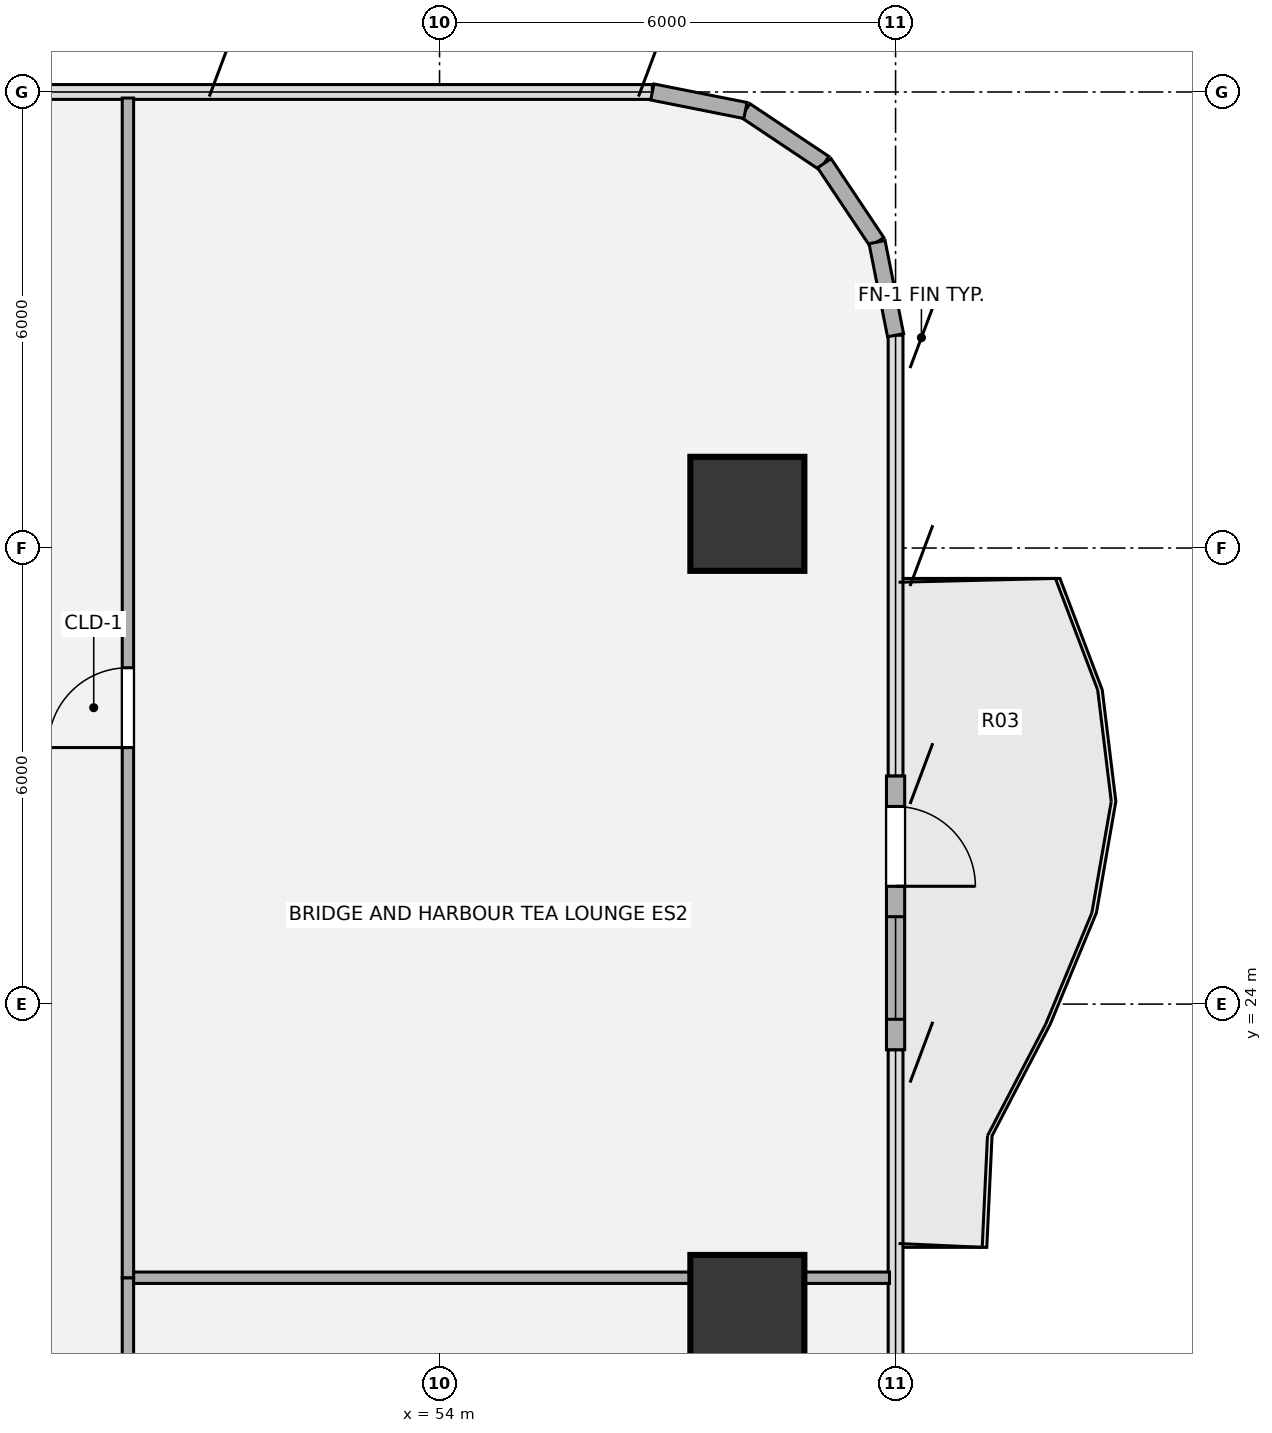
"""IFC4 building model, lengths in metres.
Left out: names, types, materials, properties, quantities, classifications, styles, units other than length and angle.
Written with IfcOpenShell. Run it as: python <this file> out.ifc"""

import sys

from ifc_helpers import new_model, si_unit, direction, frame, frame_2d, origin, origin_2d, place, context, subcontext, project, spatial, rectangle, hollow_circle, extrude, source, transform, mapped, element, fill, save


model = new_model("IFC4")
c1 = context("Model", 3, precision=1e-05, world=origin(), true_north=direction((0.0, 1.0)))
c2 = subcontext(c1, "Body", "Model", "MODEL_VIEW")
j1 = project(units=[si_unit("LENGTHUNIT", "METRE"), si_unit("PLANEANGLEUNIT", "RADIAN")], contexts=[c1])
p1 = place(None, origin())
s1 = spatial("IfcSite", under=j1, at=p1, CompositionType="ELEMENT")
p2 = place(p1, origin())
s2 = spatial("IfcBuilding", under=s1, at=p2, CompositionType="ELEMENT")
p3 = place(p2, frame((0.0, 0.0, 61.02)))
s3 = spatial("IfcBuildingStorey", under=s2, at=p3, CompositionType="ELEMENT", Elevation=61.02)
m1 = source(origin(), c2, "Body", "SweptSolid", [
    extrude(hollow_circle(Radius=0.75, WallThickness=0.05, at=origin_2d()), origin(), (0.0, 0.0, 1.0), 3.78),
])
for number, where, z_axis, x_axis in (
    (1, (58.05, 19.95, 0.0), (0.0, 0.0, 1.0), (1.0, 0.0, 0.0)),
    (2, (58.05, 30.45, 0.0), (0.0, 0.0, 1.0), (1.0, 0.0, 0.0)),
):
    element("IfcColumn", number, at=place(p3, frame(where, z_axis=z_axis, x_axis=x_axis)), inside=s3, PredefinedType="COLUMN", context=c2, shape_type="MappedRepresentation", body=[
        mapped(m1, transform((0.0, 0.0, 0.0), x_axis=(1.0, 0.0, 0.0), y_axis=(0.0, 1.0, 0.0), z_axis=(0.0, 0.0, 1.0), scale=1.0)),
    ])
for number, where, z_axis, x_axis in (
    (3, (58.025, 35.756, 0.0), (0.0, 0.0, 1.0), (0.831, -0.556, 0.0)),
    (4, (59.063, 35.063, 0.0), (0.0, 0.0, 1.0), (0.556, -0.831, 0.0)),
    (5, (59.756, 34.025, 0.0), (0.0, 0.0, 1.0), (0.195, -0.981, 0.0)),
):
    element("IfcWall", number, at=place(p3, frame(where, z_axis=z_axis, x_axis=x_axis)), inside=s3, PredefinedType="SOLIDWALL", context=c2, shape_type="SweptSolid", body=[
        extrude(rectangle(XDim=1.249, YDim=0.215, at=frame_2d((0.624, 0.0))), origin(), (0.0, 0.0, 1.0), 3.53),
    ])
p4 = place(p3, frame((60.0, 27.0, 0.0), z_axis=(0.0, 0.0, 1.0), x_axis=(0.0, -1.0, 0.0)))
e6 = element("IfcWall", 6, at=p4, inside=s3, PredefinedType="SOLIDWALL", context=c2, shape_type="SweptSolid", body=[
    extrude(rectangle(XDim=3.6, YDim=0.24, at=frame_2d((1.8, 0.0))), origin(), (0.0, 0.0, 1.0), 3.53),
])
p5 = place(p4, frame((0.4, 0.0, 0.0)))
e7 = element("IfcOpeningElement", 7, at=p5, cuts=e6, PredefinedType="OPENING", context=c2, shape_type="SweptSolid", body=[
    extrude(rectangle(XDim=1.05, YDim=2.15, at=origin_2d()), frame((0.525, 0.13, 1.075), z_axis=(0.0, -1.0, 0.0), x_axis=(1.0, 0.0, 0.0)), (0.0, 0.0, 1.0), 0.26),
])
p6 = place(p4, frame((1.85, 0.0, 0.85)))
e8 = element("IfcOpeningElement", 8, at=p6, cuts=e6, PredefinedType="OPENING", context=c2, shape_type="SweptSolid", body=[
    extrude(rectangle(XDim=1.35, YDim=1.35, at=origin_2d()), frame((0.675, 0.13, 0.675), z_axis=(0.0, -1.0, 0.0), x_axis=(1.0, 0.0, 0.0)), (0.0, 0.0, 1.0), 0.26),
])
p7 = place(p3, frame((56.8, 36.0, 0.0), z_axis=(0.0, 0.0, 1.0), x_axis=(0.980775717779, -0.195138390419, 0.0)))
e9 = element("IfcWall", 9, at=p7, inside=s3, PredefinedType="SOLIDWALL", context=c2, shape_type="SweptSolid", body=[
    extrude(rectangle(XDim=1.249, YDim=0.215, at=frame_2d((0.624, 0.0))), origin(), (0.0, 0.0, 1.0), 3.53),
])
p8 = place(p3, frame((49.9, 20.4, 0.0), z_axis=(0.0, 0.0, 1.0), x_axis=(1.0, 0.0, 0.0)))
e10 = element("IfcWall", 10, at=p8, inside=s3, PredefinedType="PARTITIONING", context=c2, shape_type="SweptSolid", body=[
    extrude(rectangle(XDim=10.02, YDim=0.15, at=frame_2d((5.01, 0.0))), origin(), (0.0, 0.0, 1.0), 2.982),
])
p9 = place(p3, frame((49.9, 6.08, 0.0), z_axis=(0.0, 0.0, 1.0), x_axis=(0.0, 1.0, 0.0)))
e11 = element("IfcWall", 11, at=p9, inside=s3, PredefinedType="PARTITIONING", context=c2, shape_type="SweptSolid", body=[
    extrude(rectangle(XDim=14.32, YDim=0.15, at=frame_2d((7.16, 0.0))), origin(), (0.0, 0.0, 1.0), 3.5),
])
p10 = place(p9, frame((6.635, 0.0, 0.0)))
e12 = element("IfcOpeningElement", 12, at=p10, cuts=e11, PredefinedType="OPENING", context=c2, shape_type="SweptSolid", body=[
    extrude(rectangle(XDim=1.05, YDim=2.1, at=origin_2d()), frame((0.525, 0.085, 1.05), z_axis=(0.0, -1.0, 0.0), x_axis=(1.0, 0.0, 0.0)), (0.0, 0.0, 1.0), 0.17),
])
p11 = place(p3, frame((49.9, 20.4, 0.0), z_axis=(0.0, 0.0, 1.0), x_axis=(0.0, 1.0, 0.0)))
e13 = element("IfcWall", 13, at=p11, inside=s3, PredefinedType="PARTITIONING", context=c2, shape_type="SweptSolid", body=[
    extrude(rectangle(XDim=15.52, YDim=0.15, at=frame_2d((7.76, 0.0))), origin(), (0.0, 0.0, 1.0), 3.5),
])
p12 = place(p11, frame((6.975, 0.0, 0.0)))
e14 = element("IfcOpeningElement", 14, at=p12, cuts=e13, PredefinedType="OPENING", context=c2, shape_type="SweptSolid", body=[
    extrude(rectangle(XDim=1.05, YDim=2.1, at=origin_2d()), frame((0.525, 0.085, 1.05), z_axis=(0.0, -1.0, 0.0), x_axis=(1.0, 0.0, 0.0)), (0.0, 0.0, 1.0), 0.17),
])
m2 = source(origin(), c2, "Body", "SweptSolid", [
    extrude(rectangle(XDim=1.05, YDim=2.15, at=origin_2d()), frame((0.525, 0.025, 1.075), z_axis=(0.0, -1.0, 0.0), x_axis=(1.0, 0.0, 0.0)), (0.0, 0.0, 1.0), 0.05),
])
p13 = place(p5, origin())
e15 = element("IfcDoor", 15, at=p13, inside=s3, OperationType="SINGLE_SWING_RIGHT", PredefinedType="DOOR", context=c2, shape_type="MappedRepresentation", body=[
    mapped(m2, transform((0.0, 0.0, 0.0), x_axis=(1.0, 0.0, 0.0), y_axis=(0.0, 1.0, 0.0), z_axis=(0.0, 0.0, 1.0), scale=1.0)),
])
fill(e7, e15)
m3 = source(origin(), c2, "Body", "SweptSolid", [
    extrude(rectangle(XDim=1.35, YDim=1.35, at=origin_2d()), frame((0.675, 0.03, 0.675), z_axis=(0.0, -1.0, 0.0), x_axis=(1.0, 0.0, 0.0)), (0.0, 0.0, 1.0), 0.06),
])
p14 = place(p6, origin())
e16 = element("IfcWindow", 16, at=p14, inside=s3, PartitioningType="SINGLE_PANEL", PredefinedType="WINDOW", context=c2, shape_type="MappedRepresentation", body=[
    mapped(m3, transform((0.0, 0.0, 0.0), x_axis=(1.0, 0.0, 0.0), y_axis=(0.0, 1.0, 0.0), z_axis=(0.0, 0.0, 1.0), scale=1.0)),
])
fill(e8, e16)
m4 = source(origin(), c2, "Body", "SweptSolid", [
    extrude(rectangle(XDim=1.05, YDim=2.1, at=origin_2d()), frame((0.525, 0.025, 1.05), z_axis=(0.0, -1.0, 0.0), x_axis=(1.0, 0.0, 0.0)), (0.0, 0.0, 1.0), 0.05),
])
p15 = place(p12, origin())
e17 = element("IfcDoor", 17, at=p15, inside=s3, OperationType="SINGLE_SWING_LEFT", PredefinedType="DOOR", context=c2, shape_type="MappedRepresentation", body=[
    mapped(m4, transform((0.0, 0.0, 0.0), x_axis=(1.0, 0.0, 0.0), y_axis=(0.0, 1.0, 0.0), z_axis=(0.0, 0.0, 1.0), scale=1.0)),
])
fill(e14, e17)
save(model, sys.argv[1])
